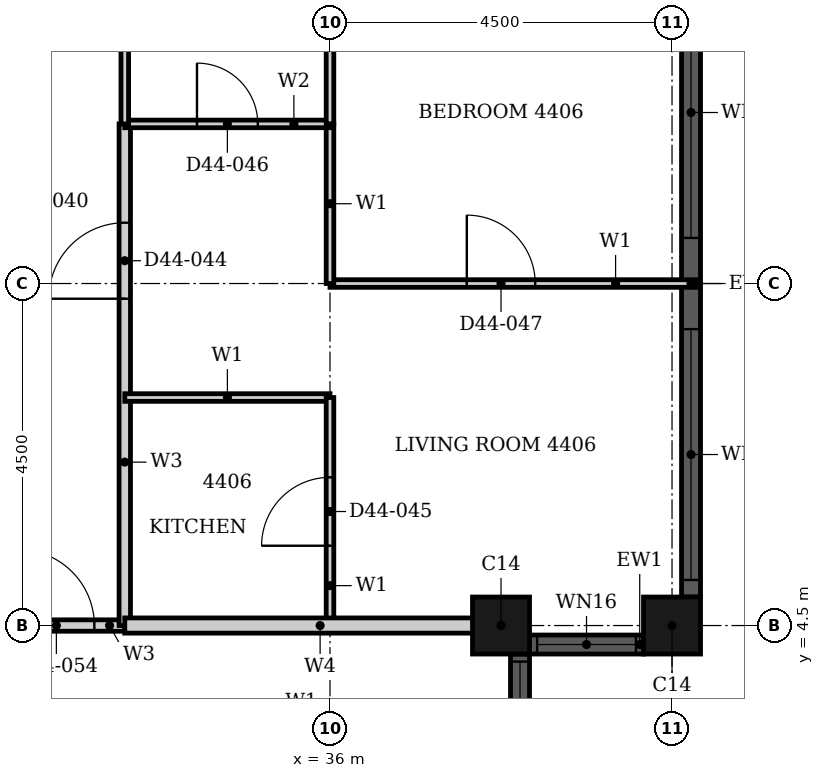
"""IFC4 building model, lengths in metres.
Left out: names, types, materials, properties, quantities, classifications, styles, units other than length and angle.
Written with IfcOpenShell. Run it as: python <this file> out.ifc"""

import sys

from ifc_helpers import new_model, si_unit, direction, frame, frame_2d, origin, origin_2d, place, context, subcontext, project, spatial, rectangle, hollow_rectangle, extrude, element, fill, save


model = new_model("IFC4")
c1 = context("Model", 3, precision=1e-05, world=origin(), true_north=direction((0.0, 1.0)))
c2 = subcontext(c1, "Body", "Model", "MODEL_VIEW")
j1 = project(units=[si_unit("LENGTHUNIT", "METRE"), si_unit("PLANEANGLEUNIT", "RADIAN")], contexts=[c1])
p1 = place(None, origin())
s1 = spatial("IfcSite", under=j1, at=p1, CompositionType="ELEMENT")
p2 = place(p1, origin())
s2 = spatial("IfcBuilding", under=s1, at=p2, CompositionType="ELEMENT")
p3 = place(p2, frame((0.0, 0.0, 176.5)))
s3 = spatial("IfcBuildingStorey", under=s2, at=p3, CompositionType="ELEMENT", Elevation=176.5)
for number, where, z_axis, x_axis in (
    (1, (38.25, 4.5, 0.0), (0.0, 0.0, 1.0), (1.0, 0.0, 0.0)),
    (2, (40.5, 4.5, 0.0), (0.0, 0.0, 1.0), (1.0, 0.0, 0.0)),
):
    element("IfcColumn", number, at=place(p3, frame(where, z_axis=z_axis, x_axis=x_axis)), inside=s3, PredefinedType="COLUMN", context=c2, shape_type="SweptSolid", body=[
        extrude(hollow_rectangle(XDim=0.75, YDim=0.75, WallThickness=0.024, at=origin_2d()), origin(), (0.0, 0.0, 1.0), 3.7),
    ])
p4 = place(p3, frame((38.5, 2.625, 0.0), z_axis=(0.0, 0.0, 1.0), x_axis=(0.0, 1.0, 0.0)))
e3 = element("IfcWall", 3, at=p4, inside=s3, PredefinedType="SOLIDWALL", context=c2, shape_type="SweptSolid", body=[
    extrude(rectangle(XDim=1.5, YDim=0.25, at=frame_2d((0.75, 0.0))), origin(), (0.0, 0.0, 1.0), 3.7),
])
p5 = place(p4, frame((0.1, 0.0, 0.9)))
e4 = element("IfcOpeningElement", 4, at=p5, cuts=e3, PredefinedType="OPENING", context=c2, shape_type="SweptSolid", body=[
    extrude(rectangle(XDim=1.3, YDim=1.85, at=frame_2d((0.65, 0.925))), frame((0.0, 0.135, 0.0), z_axis=(0.0, -1.0, 0.0), x_axis=(1.0, 0.0, 0.0)), (0.0, 0.0, 1.0), 0.27),
])
p6 = place(p3, frame((38.625, 4.25, 0.0), z_axis=(0.0, 0.0, 1.0), x_axis=(1.0, 0.0, 0.0)))
e5 = element("IfcWall", 5, at=p6, inside=s3, PredefinedType="SOLIDWALL", context=c2, shape_type="SweptSolid", body=[
    extrude(rectangle(XDim=1.5, YDim=0.25, at=frame_2d((0.75, 0.0))), origin(), (0.0, 0.0, 1.0), 3.7),
])
p7 = place(p6, frame((0.1, 0.0, 0.9)))
e6 = element("IfcOpeningElement", 6, at=p7, cuts=e5, PredefinedType="OPENING", context=c2, shape_type="SweptSolid", body=[
    extrude(rectangle(XDim=1.3, YDim=1.85, at=frame_2d((0.65, 0.925))), frame((0.0, 0.135, 0.0), z_axis=(0.0, -1.0, 0.0), x_axis=(1.0, 0.0, 0.0)), (0.0, 0.0, 1.0), 0.27),
])
p8 = place(p3, frame((40.75, 4.875, 0.0), z_axis=(0.0, 0.0, 1.0), x_axis=(0.0, 1.0, 0.0)))
e7 = element("IfcWall", 7, at=p8, inside=s3, PredefinedType="SOLIDWALL", context=c2, shape_type="SweptSolid", body=[
    extrude(rectangle(XDim=8.25, YDim=0.25, at=frame_2d((4.125, 0.0))), origin(), (0.0, 0.0, 1.0), 3.7),
])
p9 = place(p8, frame((0.225, 0.0, 0.45)))
e8 = element("IfcOpeningElement", 8, at=p9, cuts=e7, PredefinedType="OPENING", context=c2, shape_type="SweptSolid", body=[
    extrude(rectangle(XDim=3.3, YDim=2.3, at=frame_2d((1.65, 1.15))), frame((0.0, 0.135, 0.0), z_axis=(0.0, -1.0, 0.0), x_axis=(1.0, 0.0, 0.0)), (0.0, 0.0, 1.0), 0.27),
])
p10 = place(p8, frame((4.725, 0.0, 0.45)))
e9 = element("IfcOpeningElement", 9, at=p10, cuts=e7, PredefinedType="OPENING", context=c2, shape_type="SweptSolid", body=[
    extrude(rectangle(XDim=3.3, YDim=2.3, at=frame_2d((1.65, 1.15))), frame((0.0, 0.135, 0.0), z_axis=(0.0, -1.0, 0.0), x_axis=(1.0, 0.0, 0.0)), (0.0, 0.0, 1.0), 0.27),
])
p11 = place(p3, frame((31.5, 4.5, 0.0), z_axis=(0.0, 0.0, 1.0), x_axis=(1.0, 0.0, 0.0)))
e10 = element("IfcWall", 10, at=p11, inside=s3, PredefinedType="PARTITIONING", context=c2, shape_type="SweptSolid", body=[
    extrude(rectangle(XDim=1.8, YDim=0.15, at=frame_2d((0.9, 0.0))), origin(), (0.0, 0.0, 1.0), 3.4),
])
p12 = place(p11, frame((0.4, 0.0, 0.0)))
e11 = element("IfcOpeningElement", 11, at=p12, cuts=e10, PredefinedType="OPENING", context=c2, shape_type="SweptSolid", body=[
    extrude(rectangle(XDim=1.0, YDim=2.2, at=frame_2d((0.5, 1.1))), frame((0.0, 0.085, 0.0), z_axis=(0.0, -1.0, 0.0), x_axis=(1.0, 0.0, 0.0)), (0.0, 0.0, 1.0), 0.17),
])
p13 = place(p3, frame((33.3, 4.5, 0.0), z_axis=(0.0, 0.0, 1.0), x_axis=(0.0, 1.0, 0.0)))
e12 = element("IfcWall", 12, at=p13, inside=s3, PredefinedType="PARTITIONING", context=c2, shape_type="SweptSolid", body=[
    extrude(rectangle(XDim=6.6, YDim=0.15, at=frame_2d((3.3, 0.0))), origin(), (0.0, 0.0, 1.0), 3.4),
])
p14 = place(p13, frame((4.3, 0.0, 0.0)))
e13 = element("IfcOpeningElement", 13, at=p14, cuts=e12, PredefinedType="OPENING", context=c2, shape_type="SweptSolid", body=[
    extrude(rectangle(XDim=1.0, YDim=2.2, at=frame_2d((0.5, 1.1))), frame((0.0, 0.085, 0.0), z_axis=(0.0, -1.0, 0.0), x_axis=(1.0, 0.0, 0.0)), (0.0, 0.0, 1.0), 0.17),
])
p15 = place(p3, frame((33.3, 7.5, 0.0), z_axis=(0.0, 0.0, 1.0), x_axis=(1.0, 0.0, 0.0)))
e14 = element("IfcWall", 14, at=p15, inside=s3, PredefinedType="PARTITIONING", context=c2, shape_type="SweptSolid", body=[
    extrude(rectangle(XDim=2.7, YDim=0.1, at=frame_2d((1.35, 0.0))), origin(), (0.0, 0.0, 1.0), 3.4),
])
p16 = place(p3, frame((36.0, 9.0, 0.0), z_axis=(0.0, 0.0, 1.0), x_axis=(1.0, 0.0, 0.0)))
e15 = element("IfcWall", 15, at=p16, inside=s3, PredefinedType="PARTITIONING", context=c2, shape_type="SweptSolid", body=[
    extrude(rectangle(XDim=4.815, YDim=0.1, at=frame_2d((2.407, 0.0))), origin(), (0.0, 0.0, 1.0), 3.4),
])
p17 = place(p16, frame((1.8, 0.0, 0.0)))
e16 = element("IfcOpeningElement", 16, at=p17, cuts=e15, PredefinedType="OPENING", context=c2, shape_type="SweptSolid", body=[
    extrude(rectangle(XDim=0.9, YDim=2.1, at=frame_2d((0.45, 1.05))), frame((0.0, 0.06, 0.0), z_axis=(0.0, -1.0, 0.0), x_axis=(1.0, 0.0, 0.0)), (0.0, 0.0, 1.0), 0.12),
])
p18 = place(p3, frame((36.0, 9.0, 0.0), z_axis=(0.0, 0.0, 1.0), x_axis=(0.0, 1.0, 0.0)))
e17 = element("IfcWall", 17, at=p18, inside=s3, PredefinedType="PARTITIONING", context=c2, shape_type="SweptSolid", body=[
    extrude(rectangle(XDim=2.1, YDim=0.1, at=frame_2d((1.05, 0.0))), origin(), (0.0, 0.0, 1.0), 2.68),
])
p19 = place(p3, frame((36.0, 4.5, 0.0), z_axis=(0.0, 0.0, 1.0), x_axis=(0.0, 1.0, 0.0)))
e18 = element("IfcWall", 18, at=p19, inside=s3, PredefinedType="PARTITIONING", context=c2, shape_type="SweptSolid", body=[
    extrude(rectangle(XDim=3.0, YDim=0.1, at=frame_2d((1.5, 0.0))), origin(), (0.0, 0.0, 1.0), 2.68),
])
p20 = place(p19, frame((1.05, 0.0, 0.0)))
e19 = element("IfcOpeningElement", 19, at=p20, cuts=e18, PredefinedType="OPENING", context=c2, shape_type="SweptSolid", body=[
    extrude(rectangle(XDim=0.9, YDim=2.1, at=frame_2d((0.45, 1.05))), frame((0.0, 0.06, 0.0), z_axis=(0.0, -1.0, 0.0), x_axis=(1.0, 0.0, 0.0)), (0.0, 0.0, 1.0), 0.12),
])
p21 = place(p3, frame((33.3, 4.5, 0.0), z_axis=(0.0, 0.0, 1.0), x_axis=(1.0, 0.0, 0.0)))
e20 = element("IfcWall", 20, at=p21, inside=s3, PredefinedType="PARTITIONING", context=c2, shape_type="SweptSolid", body=[
    extrude(rectangle(XDim=5.14, YDim=0.2, at=frame_2d((2.57, 0.0))), origin(), (0.0, 0.0, 1.0), 3.4),
])
p22 = place(p3, frame((33.3, 11.1, 0.0), z_axis=(0.0, 0.0, 1.0), x_axis=(1.0, 0.0, 0.0)))
e21 = element("IfcWall", 21, at=p22, inside=s3, PredefinedType="PARTITIONING", context=c2, shape_type="SweptSolid", body=[
    extrude(rectangle(XDim=2.7, YDim=0.1, at=frame_2d((1.35, 0.0))), origin(), (0.0, 0.0, 1.0), 3.4),
])
p23 = place(p22, frame((0.95, 0.0, 0.0)))
e22 = element("IfcOpeningElement", 22, at=p23, cuts=e21, PredefinedType="OPENING", context=c2, shape_type="SweptSolid", body=[
    extrude(rectangle(XDim=0.8, YDim=2.1, at=frame_2d((0.4, 1.05))), frame((0.0, 0.06, 0.0), z_axis=(0.0, -1.0, 0.0), x_axis=(1.0, 0.0, 0.0)), (0.0, 0.0, 1.0), 0.12),
])
p24 = place(p3, frame((33.3, 11.1, 0.0), z_axis=(0.0, 0.0, 1.0), x_axis=(0.0, 1.0, 0.0)))
e23 = element("IfcWall", 23, at=p24, inside=s3, PredefinedType="PARTITIONING", context=c2, shape_type="SweptSolid", body=[
    extrude(rectangle(XDim=2.4, YDim=0.1, at=frame_2d((1.2, 0.0))), origin(), (0.0, 0.0, 1.0), 3.4),
])
p25 = place(p3, frame((36.0, 11.1, 0.0), z_axis=(0.0, 0.0, 1.0), x_axis=(0.0, 1.0, 0.0)))
e24 = element("IfcWall", 24, at=p25, inside=s3, PredefinedType="PARTITIONING", context=c2, shape_type="SweptSolid", body=[
    extrude(rectangle(XDim=2.4, YDim=0.1, at=frame_2d((1.2, 0.0))), origin(), (0.0, 0.0, 1.0), 2.68),
])
p26 = place(p5, origin())
e25 = element("IfcWindow", 25, at=p26, inside=s3, PartitioningType="SINGLE_PANEL", PredefinedType="WINDOW", context=c2, shape_type="SweptSolid", body=[
    extrude(rectangle(XDim=1.3, YDim=1.85, at=frame_2d((0.65, 0.925))), frame((0.0, 0.03, 0.0), z_axis=(0.0, -1.0, 0.0), x_axis=(1.0, 0.0, 0.0)), (0.0, 0.0, 1.0), 0.06),
])
fill(e4, e25)
p27 = place(p7, origin())
e26 = element("IfcWindow", 26, at=p27, inside=s3, PartitioningType="SINGLE_PANEL", PredefinedType="WINDOW", context=c2, shape_type="SweptSolid", body=[
    extrude(rectangle(XDim=1.3, YDim=1.85, at=frame_2d((0.65, 0.925))), frame((0.0, 0.03, 0.0), z_axis=(0.0, -1.0, 0.0), x_axis=(1.0, 0.0, 0.0)), (0.0, 0.0, 1.0), 0.06),
])
fill(e6, e26)
p28 = place(p9, origin())
e27 = element("IfcWindow", 27, at=p28, inside=s3, PartitioningType="SINGLE_PANEL", PredefinedType="WINDOW", context=c2, shape_type="SweptSolid", body=[
    extrude(rectangle(XDim=3.3, YDim=2.3, at=frame_2d((1.65, 1.15))), frame((0.0, 0.03, 0.0), z_axis=(0.0, -1.0, 0.0), x_axis=(1.0, 0.0, 0.0)), (0.0, 0.0, 1.0), 0.06),
])
fill(e8, e27)
p29 = place(p10, origin())
e28 = element("IfcWindow", 28, at=p29, inside=s3, PartitioningType="SINGLE_PANEL", PredefinedType="WINDOW", context=c2, shape_type="SweptSolid", body=[
    extrude(rectangle(XDim=3.3, YDim=2.3, at=frame_2d((1.65, 1.15))), frame((0.0, 0.03, 0.0), z_axis=(0.0, -1.0, 0.0), x_axis=(1.0, 0.0, 0.0)), (0.0, 0.0, 1.0), 0.06),
])
fill(e9, e28)
p30 = place(p14, origin())
e29 = element("IfcDoor", 29, at=p30, inside=s3, OperationType="SINGLE_SWING_RIGHT", PredefinedType="DOOR", context=c2, shape_type="SweptSolid", body=[
    extrude(rectangle(XDim=1.0, YDim=2.2, at=frame_2d((0.5, 1.1))), frame((0.0, 0.025, 0.0), z_axis=(0.0, -1.0, 0.0), x_axis=(1.0, 0.0, 0.0)), (0.0, 0.0, 1.0), 0.05),
])
fill(e13, e29)
p31 = place(p20, origin())
e30 = element("IfcDoor", 30, at=p31, inside=s3, OperationType="SINGLE_SWING_LEFT", PredefinedType="DOOR", context=c2, shape_type="SweptSolid", body=[
    extrude(rectangle(XDim=0.9, YDim=2.1, at=frame_2d((0.45, 1.05))), frame((0.0, 0.025, 0.0), z_axis=(0.0, -1.0, 0.0), x_axis=(1.0, 0.0, 0.0)), (0.0, 0.0, 1.0), 0.05),
])
fill(e19, e30)
p32 = place(p23, origin())
e31 = element("IfcDoor", 31, at=p32, inside=s3, OperationType="SINGLE_SWING_RIGHT", PredefinedType="DOOR", context=c2, shape_type="SweptSolid", body=[
    extrude(rectangle(XDim=0.8, YDim=2.1, at=frame_2d((0.4, 1.05))), frame((0.0, 0.025, 0.0), z_axis=(0.0, -1.0, 0.0), x_axis=(1.0, 0.0, 0.0)), (0.0, 0.0, 1.0), 0.05),
])
fill(e22, e31)
p33 = place(p17, origin())
e32 = element("IfcDoor", 32, at=p33, inside=s3, OperationType="SINGLE_SWING_RIGHT", PredefinedType="DOOR", context=c2, shape_type="SweptSolid", body=[
    extrude(rectangle(XDim=0.9, YDim=2.1, at=frame_2d((0.45, 1.05))), frame((0.0, 0.025, 0.0), z_axis=(0.0, -1.0, 0.0), x_axis=(1.0, 0.0, 0.0)), (0.0, 0.0, 1.0), 0.05),
])
fill(e16, e32)
p34 = place(p12, origin())
e33 = element("IfcDoor", 33, at=p34, inside=s3, OperationType="SINGLE_SWING_RIGHT", PredefinedType="DOOR", context=c2, shape_type="SweptSolid", body=[
    extrude(rectangle(XDim=1.0, YDim=2.2, at=frame_2d((0.5, 1.1))), frame((0.0, 0.025, 0.0), z_axis=(0.0, -1.0, 0.0), x_axis=(1.0, 0.0, 0.0)), (0.0, 0.0, 1.0), 0.05),
])
fill(e11, e33)
save(model, sys.argv[1])
